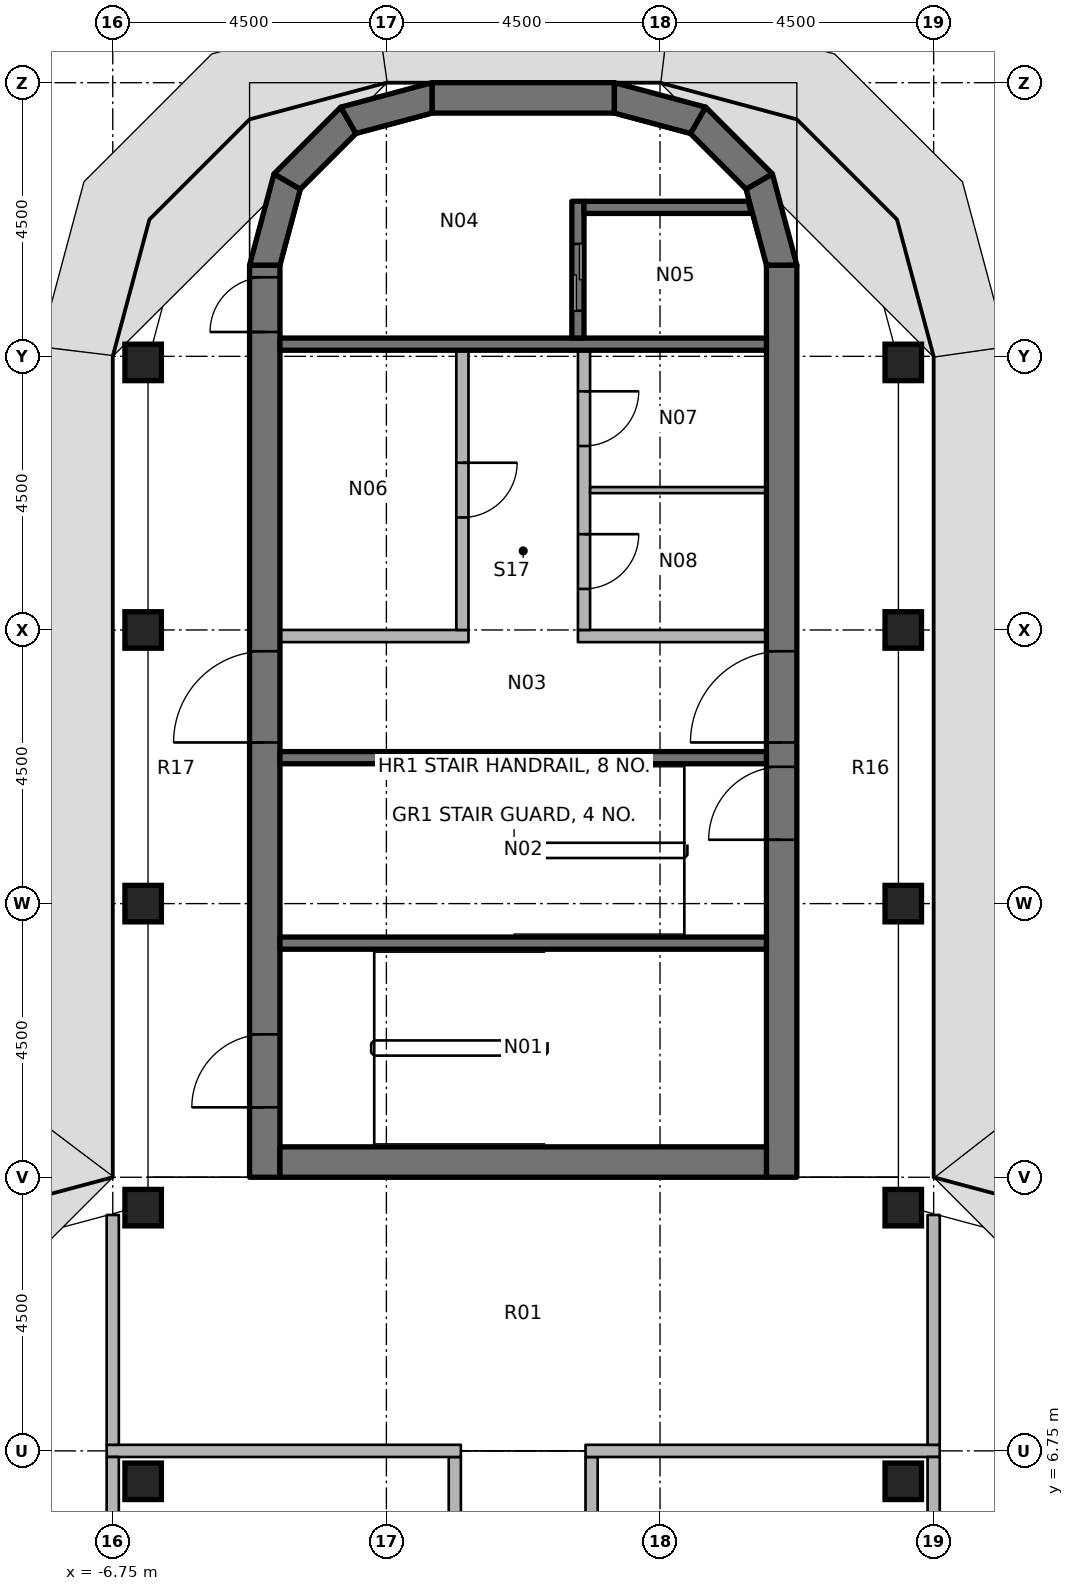
"""IFC4 building model, lengths in metres.
Left out: names, types, materials, properties, quantities, classifications, styles, units other than length and angle.
Written with IfcOpenShell. Run it as: python <this file> out.ifc"""

import sys

from ifc_helpers import new_model, si_unit, direction, frame, frame_2d, origin, origin_2d, place, context, subcontext, project, spatial, polyline, rectangle, outline, extrude, element, fill, save


model = new_model("IFC4")
c1 = context("Model", 3, precision=1e-05, world=origin(), true_north=direction((0.0, 1.0)))
c2 = subcontext(c1, "Body", "Model", "MODEL_VIEW")
j1 = project(units=[si_unit("LENGTHUNIT", "METRE"), si_unit("PLANEANGLEUNIT", "RADIAN")], contexts=[c1])
p1 = place(None, origin())
s1 = spatial("IfcSite", under=j1, at=p1, CompositionType="ELEMENT")
p2 = place(p1, origin())
s2 = spatial("IfcBuilding", under=s1, at=p2, CompositionType="ELEMENT")
p3 = place(p2, frame((0.0, 0.0, 276.4)))
s3 = spatial("IfcBuildingStorey", under=s2, at=p3, CompositionType="ELEMENT", Elevation=276.4)
for number, where, z_axis, x_axis in (
    (1, (-6.25, 6.25, 0.0), (0.0, 0.0, 1.0), (1.0, 0.0, 0.0)),
    (2, (-6.25, 10.75, 0.0), (0.0, 0.0, 1.0), (1.0, 0.0, 0.0)),
    (3, (-6.25, 15.75, 0.0), (0.0, 0.0, 1.0), (1.0, 0.0, 0.0)),
    (4, (-6.25, 20.25, 0.0), (0.0, 0.0, 1.0), (1.0, 0.0, 0.0)),
    (5, (-6.25, 24.65, 0.0), (0.0, 0.0, 1.0), (1.0, 0.0, 0.0)),
    (6, (6.25, 6.25, 0.0), (0.0, 0.0, 1.0), (1.0, 0.0, 0.0)),
    (7, (6.25, 10.75, 0.0), (0.0, 0.0, 1.0), (1.0, 0.0, 0.0)),
    (8, (6.25, 15.75, 0.0), (0.0, 0.0, 1.0), (1.0, 0.0, 0.0)),
    (9, (6.25, 20.25, 0.0), (0.0, 0.0, 1.0), (1.0, 0.0, 0.0)),
    (10, (6.25, 24.65, 0.0), (0.0, 0.0, 1.0), (1.0, 0.0, 0.0)),
):
    element("IfcColumn", number, at=place(p3, frame(where, z_axis=z_axis, x_axis=x_axis)), inside=s3, PredefinedType="COLUMN", context=c2, shape_type="SweptSolid", body=[
        extrude(rectangle(XDim=0.6, YDim=0.6, at=origin_2d()), origin(), (0.0, 0.0, 1.0), 3.65),
    ])
p4 = place(p3, frame((-4.25, 11.25, 0.0), z_axis=(0.0, 0.0, 1.0), x_axis=(0.0, 1.0, 0.0)))
e11 = element("IfcWall", 11, at=p4, inside=s3, PredefinedType="SHEAR", context=c2, shape_type="SweptSolid", body=[
    extrude(rectangle(XDim=15.0, YDim=0.5, at=frame_2d((7.5, 0.0))), origin(), (0.0, 0.0, 1.0), 3.8),
])
p5 = place(p4, frame((7.15, 0.0, 0.0)))
e12 = element("IfcOpeningElement", 12, at=p5, cuts=e11, PredefinedType="OPENING", context=c2, shape_type="SweptSolid", body=[
    extrude(rectangle(XDim=1.5, YDim=2.3, at=frame_2d((0.75, 1.15))), frame((0.0, 0.26, 0.0), z_axis=(0.0, -1.0, 0.0), x_axis=(1.0, 0.0, 0.0)), (0.0, 0.0, 1.0), 0.52),
])
p6 = place(p4, frame((13.9, 0.0, 0.0)))
e13 = element("IfcOpeningElement", 13, at=p6, cuts=e11, PredefinedType="OPENING", context=c2, shape_type="SweptSolid", body=[
    extrude(rectangle(XDim=0.9, YDim=2.1, at=frame_2d((0.45, 1.05))), frame((0.0, 0.26, 0.0), z_axis=(0.0, -1.0, 0.0), x_axis=(1.0, 0.0, 0.0)), (0.0, 0.0, 1.0), 0.52),
])
p7 = place(p4, frame((1.15, 0.0, 0.0)))
e14 = element("IfcOpeningElement", 14, at=p7, cuts=e11, PredefinedType="OPENING", context=c2, shape_type="SweptSolid", body=[
    extrude(rectangle(XDim=1.2, YDim=2.1, at=frame_2d((0.6, 1.05))), frame((0.0, 0.26, 0.0), z_axis=(0.0, -1.0, 0.0), x_axis=(1.0, 0.0, 0.0)), (0.0, 0.0, 1.0), 0.52),
])
p8 = place(p3, frame((4.25, 11.25, 0.0), z_axis=(0.0, 0.0, 1.0), x_axis=(0.0, 1.0, 0.0)))
e15 = element("IfcWall", 15, at=p8, inside=s3, PredefinedType="SHEAR", context=c2, shape_type="SweptSolid", body=[
    extrude(rectangle(XDim=15.0, YDim=0.5, at=frame_2d((7.5, 0.0))), origin(), (0.0, 0.0, 1.0), 3.8),
])
p9 = place(p8, frame((7.15, 0.0, 0.0)))
e16 = element("IfcOpeningElement", 16, at=p9, cuts=e15, PredefinedType="OPENING", context=c2, shape_type="SweptSolid", body=[
    extrude(rectangle(XDim=1.5, YDim=2.3, at=frame_2d((0.75, 1.15))), frame((0.0, 0.26, 0.0), z_axis=(0.0, -1.0, 0.0), x_axis=(1.0, 0.0, 0.0)), (0.0, 0.0, 1.0), 0.52),
])
p10 = place(p8, frame((5.55, 0.0, 0.0)))
e17 = element("IfcOpeningElement", 17, at=p10, cuts=e15, PredefinedType="OPENING", context=c2, shape_type="SweptSolid", body=[
    extrude(rectangle(XDim=1.2, YDim=2.1, at=frame_2d((0.6, 1.05))), frame((0.0, 0.26, 0.0), z_axis=(0.0, -1.0, 0.0), x_axis=(1.0, 0.0, 0.0)), (0.0, 0.0, 1.0), 0.52),
])
p11 = place(p3, frame((-4.0, 11.5, 0.0), z_axis=(0.0, 0.0, 1.0), x_axis=(1.0, 0.0, 0.0)))
e18 = element("IfcWall", 18, at=p11, inside=s3, PredefinedType="SHEAR", context=c2, shape_type="SweptSolid", body=[
    extrude(rectangle(XDim=8.0, YDim=0.5, at=frame_2d((4.0, 0.0))), origin(), (0.0, 0.0, 1.0), 3.8),
])
p12 = place(p3, frame((-1.5, 29.0, 0.0), z_axis=(0.0, 0.0, 1.0), x_axis=(1.0, 0.0, 0.0)))
e19 = element("IfcWall", 19, at=p12, inside=s3, PredefinedType="SHEAR", context=c2, shape_type="SweptSolid", body=[
    extrude(rectangle(XDim=3.0, YDim=0.5, at=frame_2d((1.5, 0.0))), origin(), (0.0, 0.0, 1.0), 3.8),
])
p13 = place(p3, origin())
e20 = element("IfcWall", 20, at=p13, inside=s3, PredefinedType="SHEAR", context=c2, shape_type="SweptSolid", body=[
    extrude(outline(polyline([(-4.5, 26.25), (-4.098, 27.75), (-3.665, 27.5), (-4.0, 26.25), (-4.5, 26.25)])), origin(), (0.0, 0.0, 1.0), 3.8),
])
p14 = place(p3, origin())
e21 = element("IfcWall", 21, at=p14, inside=s3, PredefinedType="SHEAR", context=c2, shape_type="SweptSolid", body=[
    extrude(outline(polyline([(-4.098, 27.75), (-3.0, 28.848), (-2.75, 28.415), (-3.665, 27.5), (-4.098, 27.75)])), origin(), (0.0, 0.0, 1.0), 3.8),
])
p15 = place(p3, origin())
e22 = element("IfcWall", 22, at=p15, inside=s3, PredefinedType="SHEAR", context=c2, shape_type="SweptSolid", body=[
    extrude(outline(polyline([(-3.0, 28.848), (-1.5, 29.25), (-1.5, 28.75), (-2.75, 28.415), (-3.0, 28.848)])), origin(), (0.0, 0.0, 1.0), 3.8),
])
p16 = place(p3, origin())
e23 = element("IfcWall", 23, at=p16, inside=s3, PredefinedType="SHEAR", context=c2, shape_type="SweptSolid", body=[
    extrude(outline(polyline([(4.5, 26.25), (4.098, 27.75), (3.665, 27.5), (4.0, 26.25), (4.5, 26.25)])), origin(), (0.0, 0.0, 1.0), 3.8),
])
p17 = place(p3, origin())
e24 = element("IfcWall", 24, at=p17, inside=s3, PredefinedType="SHEAR", context=c2, shape_type="SweptSolid", body=[
    extrude(outline(polyline([(4.098, 27.75), (3.0, 28.848), (2.75, 28.415), (3.665, 27.5), (4.098, 27.75)])), origin(), (0.0, 0.0, 1.0), 3.8),
])
p18 = place(p3, origin())
e25 = element("IfcWall", 25, at=p18, inside=s3, PredefinedType="SHEAR", context=c2, shape_type="SweptSolid", body=[
    extrude(outline(polyline([(3.0, 28.848), (1.5, 29.25), (1.5, 28.75), (2.75, 28.415), (3.0, 28.848)])), origin(), (0.0, 0.0, 1.0), 3.8),
])
p19 = place(p3, frame((-4.0, 24.95, 0.0), z_axis=(0.0, 0.0, 1.0), x_axis=(1.0, 0.0, 0.0)))
e26 = element("IfcWall", 26, at=p19, inside=s3, PredefinedType="SHEAR", context=c2, shape_type="SweptSolid", body=[
    extrude(rectangle(XDim=8.0, YDim=0.2, at=frame_2d((4.0, 0.0))), origin(), (0.0, 0.0, 1.0), 3.65),
])
p20 = place(p3, frame((0.9, 27.3, 0.0), z_axis=(0.0, 0.0, 1.0), x_axis=(0.0, -1.0, 0.0)))
e27 = element("IfcWall", 27, at=p20, inside=s3, PredefinedType="SHEAR", context=c2, shape_type="SweptSolid", body=[
    extrude(rectangle(XDim=2.25, YDim=0.2, at=frame_2d((1.125, 0.0))), origin(), (0.0, 0.0, 1.0), 3.65),
])
p21 = place(p20, frame((0.7, 0.0, 0.0)))
e28 = element("IfcOpeningElement", 28, at=p21, cuts=e27, PredefinedType="OPENING", context=c2, shape_type="SweptSolid", body=[
    extrude(rectangle(XDim=1.1, YDim=2.3, at=frame_2d((0.55, 1.15))), frame((0.0, 0.11, 0.0), z_axis=(0.0, -1.0, 0.0), x_axis=(1.0, 0.0, 0.0)), (0.0, 0.0, 1.0), 0.22),
])
p22 = place(p3, origin())
e29 = element("IfcWall", 29, at=p22, inside=s3, PredefinedType="SHEAR", context=c2, shape_type="SweptSolid", body=[
    extrude(outline(polyline([(1.0, 27.1), (3.755, 27.1), (3.701, 27.3), (1.0, 27.3), (1.0, 27.1)])), origin(), (0.0, 0.0, 1.0), 3.65),
])
for number, where, z_axis, x_axis in (
    (30, (-4.0, 18.15, 0.0), (0.0, 0.0, 1.0), (1.0, 0.0, 0.0)),
    (31, (-4.0, 15.1, 0.0), (0.0, 0.0, 1.0), (1.0, 0.0, 0.0)),
):
    element("IfcWall", number, at=place(p3, frame(where, z_axis=z_axis, x_axis=x_axis)), inside=s3, PredefinedType="SHEAR", context=c2, shape_type="SweptSolid", body=[
        extrude(rectangle(XDim=8.0, YDim=0.2, at=frame_2d((4.0, 0.0))), origin(), (0.0, 0.0, 1.0), 3.65),
    ])
p23 = place(p3, frame((-4.0, 20.15, 0.0), z_axis=(0.0, 0.0, 1.0), x_axis=(1.0, 0.0, 0.0)))
e32 = element("IfcWall", 32, at=p23, inside=s3, PredefinedType="PARTITIONING", context=c2, shape_type="SweptSolid", body=[
    extrude(rectangle(XDim=3.1, YDim=0.2, at=frame_2d((1.55, 0.0))), origin(), (0.0, 0.0, 1.0), 3.65),
])
p24 = place(p3, frame((-1.0, 24.85, 0.0), z_axis=(0.0, 0.0, 1.0), x_axis=(0.0, -1.0, 0.0)))
e33 = element("IfcWall", 33, at=p24, inside=s3, PredefinedType="PARTITIONING", context=c2, shape_type="SweptSolid", body=[
    extrude(rectangle(XDim=4.6, YDim=0.2, at=frame_2d((2.3, 0.0))), origin(), (0.0, 0.0, 1.0), 3.65),
])
p25 = place(p24, frame((1.85, 0.0, 0.0)))
e34 = element("IfcOpeningElement", 34, at=p25, cuts=e33, PredefinedType="OPENING", context=c2, shape_type="SweptSolid", body=[
    extrude(rectangle(XDim=0.9, YDim=2.1, at=frame_2d((0.45, 1.05))), frame((0.0, 0.11, 0.0), z_axis=(0.0, -1.0, 0.0), x_axis=(1.0, 0.0, 0.0)), (0.0, 0.0, 1.0), 0.22),
])
p26 = place(p3, frame((0.9, 20.15, 0.0), z_axis=(0.0, 0.0, 1.0), x_axis=(1.0, 0.0, 0.0)))
e35 = element("IfcWall", 35, at=p26, inside=s3, PredefinedType="PARTITIONING", context=c2, shape_type="SweptSolid", body=[
    extrude(rectangle(XDim=3.1, YDim=0.2, at=frame_2d((1.55, 0.0))), origin(), (0.0, 0.0, 1.0), 3.65),
])
p27 = place(p3, frame((1.0, 24.85, 0.0), z_axis=(0.0, 0.0, 1.0), x_axis=(0.0, -1.0, 0.0)))
e36 = element("IfcWall", 36, at=p27, inside=s3, PredefinedType="PARTITIONING", context=c2, shape_type="SweptSolid", body=[
    extrude(rectangle(XDim=4.6, YDim=0.2, at=frame_2d((2.3, 0.0))), origin(), (0.0, 0.0, 1.0), 3.65),
])
p28 = place(p27, frame((0.675, 0.0, 0.0)))
e37 = element("IfcOpeningElement", 37, at=p28, cuts=e36, PredefinedType="OPENING", context=c2, shape_type="SweptSolid", body=[
    extrude(rectangle(XDim=0.9, YDim=2.1, at=frame_2d((0.45, 1.05))), frame((0.0, 0.11, 0.0), z_axis=(0.0, -1.0, 0.0), x_axis=(1.0, 0.0, 0.0)), (0.0, 0.0, 1.0), 0.22),
])
p29 = place(p27, frame((3.025, 0.0, 0.0)))
e38 = element("IfcOpeningElement", 38, at=p29, cuts=e36, PredefinedType="OPENING", context=c2, shape_type="SweptSolid", body=[
    extrude(rectangle(XDim=0.9, YDim=2.1, at=frame_2d((0.45, 1.05))), frame((0.0, 0.11, 0.0), z_axis=(0.0, -1.0, 0.0), x_axis=(1.0, 0.0, 0.0)), (0.0, 0.0, 1.0), 0.22),
])
p30 = place(p3, frame((1.1, 22.55, 0.0), z_axis=(0.0, 0.0, 1.0), x_axis=(1.0, 0.0, 0.0)))
e39 = element("IfcWall", 39, at=p30, inside=s3, PredefinedType="PARTITIONING", context=c2, shape_type="SweptSolid", body=[
    extrude(rectangle(XDim=2.9, YDim=0.1, at=frame_2d((1.45, 0.0))), origin(), (0.0, 0.0, 1.0), 3.65),
])
for number, where, z_axis, x_axis in (
    (40, (1.125, 0.1, 0.0), (0.0, 0.0, 1.0), (0.0, 1.0, 0.0)),
    (41, (-1.125, 0.1, 0.0), (0.0, 0.0, 1.0), (0.0, 1.0, 0.0)),
):
    element("IfcWall", number, at=place(p3, frame(where, z_axis=z_axis, x_axis=x_axis)), inside=s3, PredefinedType="PARTITIONING", context=c2, shape_type="SweptSolid", body=[
        extrude(rectangle(XDim=6.55, YDim=0.2, at=frame_2d((3.275, 0.0))), origin(), (0.0, 0.0, 1.0), 2.75),
    ])
p31 = place(p3, frame((1.025, 6.75, 0.0), z_axis=(0.0, 0.0, 1.0), x_axis=(1.0, 0.0, 0.0)))
e42 = element("IfcWall", 42, at=p31, inside=s3, PredefinedType="PARTITIONING", context=c2, shape_type="SweptSolid", body=[
    extrude(rectangle(XDim=5.825, YDim=0.2, at=frame_2d((2.913, 0.0))), origin(), (0.0, 0.0, 1.0), 2.75),
])
p32 = place(p3, frame((6.75, 6.85, 0.0), z_axis=(0.0, 0.0, 1.0), x_axis=(0.0, 1.0, 0.0)))
e43 = element("IfcWall", 43, at=p32, inside=s3, PredefinedType="PARTITIONING", context=c2, shape_type="SweptSolid", body=[
    extrude(rectangle(XDim=3.78, YDim=0.2, at=frame_2d((1.89, 0.0))), origin(), (0.0, 0.0, 1.0), 2.75),
])
p33 = place(p3, frame((-6.85, 6.75, 0.0), z_axis=(0.0, 0.0, 1.0), x_axis=(1.0, 0.0, 0.0)))
e44 = element("IfcWall", 44, at=p33, inside=s3, PredefinedType="PARTITIONING", context=c2, shape_type="SweptSolid", body=[
    extrude(rectangle(XDim=5.825, YDim=0.2, at=frame_2d((2.913, 0.0))), origin(), (0.0, 0.0, 1.0), 2.75),
])
p34 = place(p3, frame((-6.75, 6.85, 0.0), z_axis=(0.0, 0.0, 1.0), x_axis=(0.0, 1.0, 0.0)))
e45 = element("IfcWall", 45, at=p34, inside=s3, PredefinedType="PARTITIONING", context=c2, shape_type="SweptSolid", body=[
    extrude(rectangle(XDim=3.78, YDim=0.2, at=frame_2d((1.89, 0.0))), origin(), (0.0, 0.0, 1.0), 2.75),
])
for number, where, z_axis, x_axis in (
    (46, (6.75, 0.1, 0.0), (0.0, 0.0, 1.0), (0.0, 1.0, 0.0)),
    (47, (-6.75, 0.1, 0.0), (0.0, 0.0, 1.0), (0.0, 1.0, 0.0)),
):
    element("IfcWall", number, at=place(p3, frame(where, z_axis=z_axis, x_axis=x_axis)), inside=s3, PredefinedType="PARTITIONING", context=c2, shape_type="SweptSolid", body=[
        extrude(rectangle(XDim=6.55, YDim=0.2, at=frame_2d((3.275, 0.0))), origin(), (0.0, 0.0, 1.0), 2.75),
    ])
p35 = place(p5, origin())
e48 = element("IfcDoor", 48, at=p35, inside=s3, OperationType="DOUBLE_DOOR_SINGLE_SWING", PredefinedType="DOOR", context=c2, shape_type="SweptSolid", body=[
    extrude(rectangle(XDim=1.5, YDim=2.3, at=frame_2d((0.75, 1.15))), frame((0.0, 0.025, 0.0), z_axis=(0.0, -1.0, 0.0), x_axis=(1.0, 0.0, 0.0)), (0.0, 0.0, 1.0), 0.05),
])
fill(e12, e48)
p36 = place(p9, origin())
e49 = element("IfcDoor", 49, at=p36, inside=s3, OperationType="DOUBLE_DOOR_SINGLE_SWING", PredefinedType="DOOR", context=c2, shape_type="SweptSolid", body=[
    extrude(rectangle(XDim=1.5, YDim=2.3, at=frame_2d((0.75, 1.15))), frame((0.0, 0.025, 0.0), z_axis=(0.0, -1.0, 0.0), x_axis=(1.0, 0.0, 0.0)), (0.0, 0.0, 1.0), 0.05),
])
fill(e16, e49)
p37 = place(p6, origin())
e50 = element("IfcDoor", 50, at=p37, inside=s3, OperationType="SINGLE_SWING_LEFT", PredefinedType="DOOR", context=c2, shape_type="SweptSolid", body=[
    extrude(rectangle(XDim=0.9, YDim=2.1, at=frame_2d((0.45, 1.05))), frame((0.0, 0.025, 0.0), z_axis=(0.0, -1.0, 0.0), x_axis=(1.0, 0.0, 0.0)), (0.0, 0.0, 1.0), 0.05),
])
fill(e13, e50)
p38 = place(p10, origin())
e51 = element("IfcDoor", 51, at=p38, inside=s3, OperationType="SINGLE_SWING_RIGHT", PredefinedType="DOOR", context=c2, shape_type="SweptSolid", body=[
    extrude(rectangle(XDim=1.2, YDim=2.1, at=frame_2d((0.6, 1.05))), frame((0.0, 0.025, 0.0), z_axis=(0.0, -1.0, 0.0), x_axis=(1.0, 0.0, 0.0)), (0.0, 0.0, 1.0), 0.05),
])
fill(e17, e51)
p39 = place(p7, origin())
e52 = element("IfcDoor", 52, at=p39, inside=s3, OperationType="SINGLE_SWING_LEFT", PredefinedType="DOOR", context=c2, shape_type="SweptSolid", body=[
    extrude(rectangle(XDim=1.2, YDim=2.1, at=frame_2d((0.6, 1.05))), frame((0.0, 0.025, 0.0), z_axis=(0.0, -1.0, 0.0), x_axis=(1.0, 0.0, 0.0)), (0.0, 0.0, 1.0), 0.05),
])
fill(e14, e52)
p40 = place(p21, origin())
e53 = element("IfcDoor", 53, at=p40, inside=s3, OperationType="DOUBLE_DOOR_SLIDING", PredefinedType="DOOR", context=c2, shape_type="SweptSolid", body=[
    extrude(rectangle(XDim=1.1, YDim=2.3, at=frame_2d((0.55, 1.15))), frame((0.0, 0.025, 0.0), z_axis=(0.0, -1.0, 0.0), x_axis=(1.0, 0.0, 0.0)), (0.0, 0.0, 1.0), 0.05),
])
fill(e28, e53)
p41 = place(p25, origin())
e54 = element("IfcDoor", 54, at=p41, inside=s3, OperationType="SINGLE_SWING_LEFT", PredefinedType="DOOR", context=c2, shape_type="SweptSolid", body=[
    extrude(rectangle(XDim=0.9, YDim=2.1, at=frame_2d((0.45, 1.05))), frame((0.0, 0.025, 0.0), z_axis=(0.0, -1.0, 0.0), x_axis=(1.0, 0.0, 0.0)), (0.0, 0.0, 1.0), 0.05),
])
fill(e34, e54)
p42 = place(p28, origin())
e55 = element("IfcDoor", 55, at=p42, inside=s3, OperationType="SINGLE_SWING_LEFT", PredefinedType="DOOR", context=c2, shape_type="SweptSolid", body=[
    extrude(rectangle(XDim=0.9, YDim=2.1, at=frame_2d((0.45, 1.05))), frame((0.0, 0.025, 0.0), z_axis=(0.0, -1.0, 0.0), x_axis=(1.0, 0.0, 0.0)), (0.0, 0.0, 1.0), 0.05),
])
fill(e37, e55)
p43 = place(p29, origin())
e56 = element("IfcDoor", 56, at=p43, inside=s3, OperationType="SINGLE_SWING_RIGHT", PredefinedType="DOOR", context=c2, shape_type="SweptSolid", body=[
    extrude(rectangle(XDim=0.9, YDim=2.1, at=frame_2d((0.45, 1.05))), frame((0.0, 0.025, 0.0), z_axis=(0.0, -1.0, 0.0), x_axis=(1.0, 0.0, 0.0)), (0.0, 0.0, 1.0), 0.05),
])
fill(e38, e56)
save(model, sys.argv[1])
